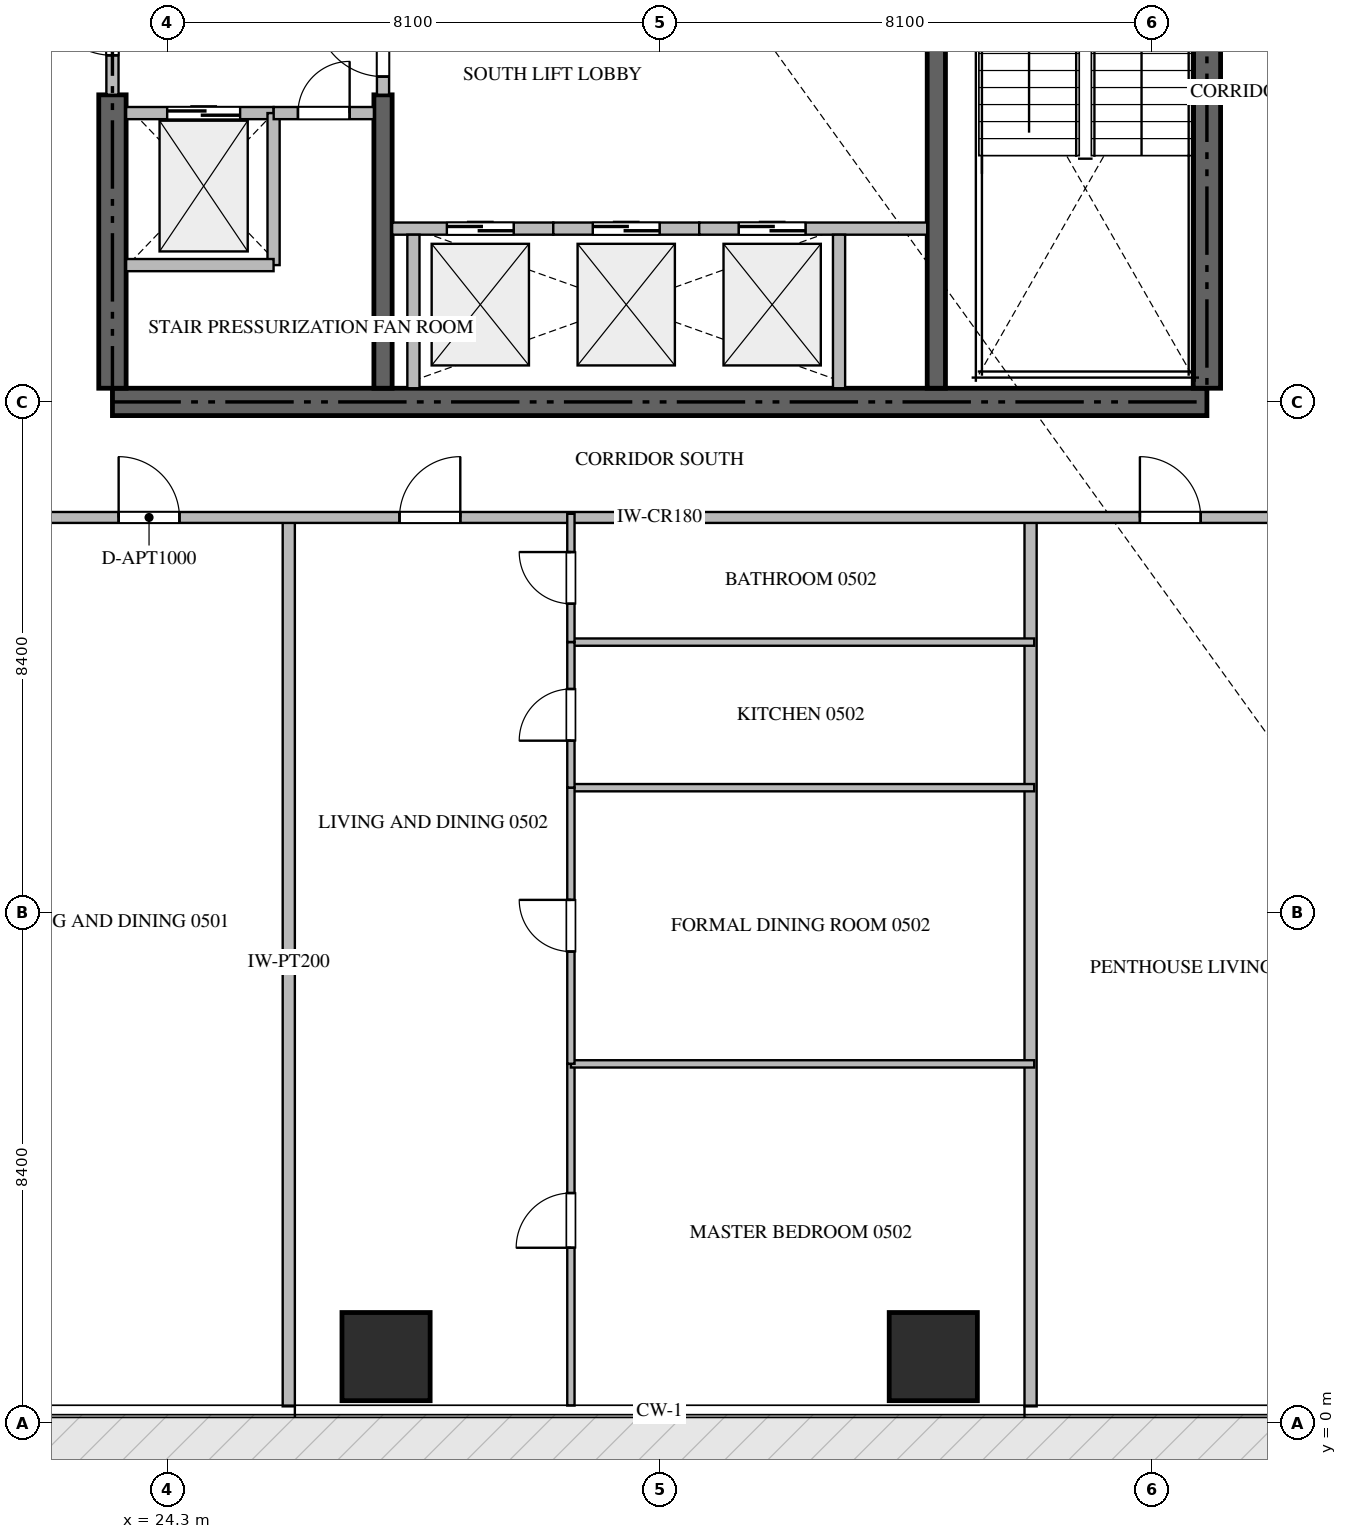
"""IFC4 building model, lengths in metres.
Left out: names, types, materials, properties, quantities, classifications, styles, units other than length and angle.
Written with IfcOpenShell. Run it as: python <this file> out.ifc"""

import sys

from ifc_helpers import new_model, si_unit, direction, frame, frame_2d, origin, origin_2d, place, context, subcontext, project, spatial, rectangle, extrude, source, transform, mapped, element, fill, save


model = new_model("IFC4")
c1 = context("Model", 3, precision=1e-05, world=origin(), true_north=direction((0.0, 1.0)))
c2 = subcontext(c1, "Body", "Model", "MODEL_VIEW")
j1 = project(units=[si_unit("LENGTHUNIT", "METRE"), si_unit("PLANEANGLEUNIT", "RADIAN")], contexts=[c1])
p1 = place(None, origin())
s1 = spatial("IfcSite", under=j1, at=p1, CompositionType="ELEMENT")
p2 = place(p1, origin())
s2 = spatial("IfcBuilding", under=s1, at=p2, CompositionType="ELEMENT")
p3 = place(p2, frame((0.0, 0.0, 26.7)))
s3 = spatial("IfcBuildingStorey", under=s2, at=p3, CompositionType="ELEMENT", Elevation=26.7)
p4 = place(p3, frame((23.4, 16.8, -0.44), z_axis=(0.0, 0.0, 1.0), x_axis=(1.0, 0.0, 0.0)))
e1 = element("IfcWall", 1, at=p4, inside=s3, PredefinedType="SHEAR", context=c2, shape_type="SweptSolid", body=[
    extrude(rectangle(XDim=18.0, YDim=0.45, at=frame_2d((9.0, 0.0))), origin(), (0.0, 0.0, 1.0), 3.928),
])
p5 = place(p3, frame((23.4, 17.025, -0.44), z_axis=(0.0, 0.0, 1.0), x_axis=(0.0, 1.0, 0.0)))
e2 = element("IfcWall", 2, at=p5, inside=s3, PredefinedType="SHEAR", context=c2, shape_type="SweptSolid", body=[
    extrude(rectangle(XDim=4.825, YDim=0.45, at=frame_2d((2.413, 0.0))), origin(), (0.0, 0.0, 1.0), 3.928),
])
p6 = place(p3, frame((41.4, 17.025, -0.44), z_axis=(0.0, 0.0, 1.0), x_axis=(0.0, 1.0, 0.0)))
e3 = element("IfcWall", 3, at=p6, inside=s3, PredefinedType="SHEAR", context=c2, shape_type="SweptSolid", body=[
    extrude(rectangle(XDim=8.325, YDim=0.45, at=frame_2d((4.163, 0.0))), origin(), (0.0, 0.0, 1.0), 3.928),
])
p7 = place(p3, frame((27.85, 17.025, -0.44), z_axis=(0.0, 0.0, 1.0), x_axis=(0.0, 1.0, 0.0)))
e4 = element("IfcWall", 4, at=p7, inside=s3, PredefinedType="SHEAR", context=c2, shape_type="SweptSolid", body=[
    extrude(rectangle(XDim=4.825, YDim=0.3, at=frame_2d((2.413, 0.0))), origin(), (0.0, 0.0, 1.0), 3.928),
])
p8 = place(p3, frame((36.95, 17.025, -0.44), z_axis=(0.0, 0.0, 1.0), x_axis=(0.0, 1.0, 0.0)))
e5 = element("IfcWall", 5, at=p8, inside=s3, PredefinedType="SHEAR", context=c2, shape_type="SweptSolid", body=[
    extrude(rectangle(XDim=8.325, YDim=0.3, at=frame_2d((4.163, 0.0))), origin(), (0.0, 0.0, 1.0), 3.928),
])
m1 = source(origin(), c2, "Body", "SweptSolid", [
    extrude(rectangle(XDim=1.45, YDim=1.45, at=origin_2d()), origin(), (0.0, 0.0, 1.0), 3.93),
])
for number, where, z_axis, x_axis in (
    (6, (27.9, 1.1, -0.44), (0.0, 0.0, 1.0), (1.0, 0.0, 0.0)),
    (7, (36.9, 1.1, -0.44), (0.0, 0.0, 1.0), (1.0, 0.0, 0.0)),
):
    element("IfcColumn", number, at=place(p3, frame(where, z_axis=z_axis, x_axis=x_axis)), inside=s3, PredefinedType="COLUMN", context=c2, shape_type="MappedRepresentation", body=[
        mapped(m1, transform((0.0, 0.0, 0.0), scale=1.0)),
    ])
p9 = place(p3, frame((23.625, 21.55, 0.0), z_axis=(0.0, 0.0, 1.0), x_axis=(1.0, 0.0, 0.0)))
e8 = element("IfcWall", 8, at=p9, inside=s3, PredefinedType="STANDARD", context=c2, shape_type="SweptSolid", body=[
    extrude(rectangle(XDim=2.425, YDim=0.2, at=frame_2d((1.212, 0.0))), origin(), (0.0, 0.0, 1.0), 3.49),
])
p10 = place(p9, frame((0.675, 0.0, 0.0)))
e9 = element("IfcOpeningElement", 9, at=p10, cuts=e8, PredefinedType="OPENING", context=c2, shape_type="SweptSolid", body=[
    extrude(rectangle(XDim=1.2, YDim=2.2, at=frame_2d((0.6, 1.1))), frame((0.0, 0.11, 0.0), z_axis=(0.0, -1.0, 0.0), x_axis=(1.0, 0.0, 0.0)), (0.0, 0.0, 1.0), 0.22),
])
p11 = place(p3, frame((28.0, 19.65, 0.0), z_axis=(0.0, 0.0, 1.0), x_axis=(1.0, 0.0, 0.0)))
e10 = element("IfcWall", 10, at=p11, inside=s3, PredefinedType="STANDARD", context=c2, shape_type="SweptSolid", body=[
    extrude(rectangle(XDim=2.65, YDim=0.2, at=frame_2d((1.325, 0.0))), origin(), (0.0, 0.0, 1.0), 3.49),
])
p12 = place(p11, frame((0.9, 0.0, 0.0)))
e11 = element("IfcOpeningElement", 11, at=p12, cuts=e10, PredefinedType="OPENING", context=c2, shape_type="SweptSolid", body=[
    extrude(rectangle(XDim=1.1, YDim=2.2, at=frame_2d((0.55, 1.1))), frame((0.0, 0.11, 0.0), z_axis=(0.0, -1.0, 0.0), x_axis=(1.0, 0.0, 0.0)), (0.0, 0.0, 1.0), 0.22),
])
p13 = place(p3, frame((28.35, 17.025, 0.0), z_axis=(0.0, 0.0, 1.0), x_axis=(0.0, 1.0, 0.0)))
e12 = element("IfcWall", 12, at=p13, inside=s3, PredefinedType="STANDARD", context=c2, shape_type="SweptSolid", body=[
    extrude(rectangle(XDim=2.525, YDim=0.2, at=frame_2d((1.263, 0.0))), origin(), (0.0, 0.0, 1.0), 3.49),
])
p14 = place(p3, frame((30.65, 19.65, 0.0), z_axis=(0.0, 0.0, 1.0), x_axis=(1.0, 0.0, 0.0)))
e13 = element("IfcWall", 13, at=p14, inside=s3, PredefinedType="STANDARD", context=c2, shape_type="SweptSolid", body=[
    extrude(rectangle(XDim=2.4, YDim=0.2, at=frame_2d((1.2, 0.0))), origin(), (0.0, 0.0, 1.0), 3.49),
])
p15 = place(p14, frame((0.65, 0.0, 0.0)))
e14 = element("IfcOpeningElement", 14, at=p15, cuts=e13, PredefinedType="OPENING", context=c2, shape_type="SweptSolid", body=[
    extrude(rectangle(XDim=1.1, YDim=2.2, at=frame_2d((0.55, 1.1))), frame((0.0, 0.11, 0.0), z_axis=(0.0, -1.0, 0.0), x_axis=(1.0, 0.0, 0.0)), (0.0, 0.0, 1.0), 0.22),
])
p16 = place(p3, frame((33.05, 19.65, 0.0), z_axis=(0.0, 0.0, 1.0), x_axis=(1.0, 0.0, 0.0)))
e15 = element("IfcWall", 15, at=p16, inside=s3, PredefinedType="STANDARD", context=c2, shape_type="SweptSolid", body=[
    extrude(rectangle(XDim=3.75, YDim=0.2, at=frame_2d((1.875, 0.0))), origin(), (0.0, 0.0, 1.0), 3.49),
])
p17 = place(p16, frame((0.65, 0.0, 0.0)))
e16 = element("IfcOpeningElement", 16, at=p17, cuts=e15, PredefinedType="OPENING", context=c2, shape_type="SweptSolid", body=[
    extrude(rectangle(XDim=1.1, YDim=2.2, at=frame_2d((0.55, 1.1))), frame((0.0, 0.11, 0.0), z_axis=(0.0, -1.0, 0.0), x_axis=(1.0, 0.0, 0.0)), (0.0, 0.0, 1.0), 0.22),
])
p18 = place(p3, frame((35.35, 17.025, 0.0), z_axis=(0.0, 0.0, 1.0), x_axis=(0.0, 1.0, 0.0)))
e17 = element("IfcWall", 17, at=p18, inside=s3, PredefinedType="STANDARD", context=c2, shape_type="SweptSolid", body=[
    extrude(rectangle(XDim=2.525, YDim=0.2, at=frame_2d((1.263, 0.0))), origin(), (0.0, 0.0, 1.0), 3.49),
])
p19 = place(p3, frame((26.05, 19.05, 0.0), z_axis=(0.0, 0.0, 1.0), x_axis=(0.0, 1.0, 0.0)))
e18 = element("IfcWall", 18, at=p19, inside=s3, PredefinedType="STANDARD", context=c2, shape_type="SweptSolid", body=[
    extrude(rectangle(XDim=2.5, YDim=0.2, at=frame_2d((1.25, 0.0))), origin(), (0.0, 0.0, 1.0), 3.49),
])
p20 = place(p3, frame((23.625, 19.05, 0.0), z_axis=(0.0, 0.0, 1.0), x_axis=(1.0, 0.0, 0.0)))
e19 = element("IfcWall", 19, at=p20, inside=s3, PredefinedType="STANDARD", context=c2, shape_type="SweptSolid", body=[
    extrude(rectangle(XDim=2.425, YDim=0.2, at=frame_2d((1.212, 0.0))), origin(), (0.0, 0.0, 1.0), 3.49),
])
p21 = place(p3, frame((26.052, 21.55, 0.0), z_axis=(0.0, 0.0, 1.0), x_axis=(1.0, 0.0, 0.0)))
e20 = element("IfcWall", 20, at=p21, inside=s3, PredefinedType="STANDARD", context=c2, shape_type="SweptSolid", body=[
    extrude(rectangle(XDim=1.648, YDim=0.2, at=frame_2d((0.824, 0.0))), origin(), (0.0, 0.0, 1.0), 3.49),
])
p22 = place(p21, frame((0.399, 0.0, 0.0)))
e21 = element("IfcOpeningElement", 21, at=p22, cuts=e20, PredefinedType="OPENING", context=c2, shape_type="SweptSolid", body=[
    extrude(rectangle(XDim=0.85, YDim=2.1, at=frame_2d((0.425, 1.05))), frame((0.0, 0.11, 0.0), z_axis=(0.0, -1.0, 0.0), x_axis=(1.0, 0.0, 0.0)), (0.0, 0.0, 1.0), 0.22),
])
p23 = place(p3, frame((23.4, 21.852, 0.0), z_axis=(0.0, 0.0, 1.0), x_axis=(0.0, 1.0, 0.0)))
e22 = element("IfcWall", 22, at=p23, inside=s3, PredefinedType="STANDARD", context=c2, shape_type="SweptSolid", body=[
    extrude(rectangle(XDim=2.396, YDim=0.2, at=frame_2d((1.198, 0.0))), origin(), (0.0, 0.0, 1.0), 3.49),
])
p24 = place(p23, frame((0.648, 0.0, 0.0)))
e23 = element("IfcOpeningElement", 23, at=p24, cuts=e22, PredefinedType="OPENING", context=c2, shape_type="SweptSolid", body=[
    extrude(rectangle(XDim=1.1, YDim=2.15, at=frame_2d((0.55, 1.075))), frame((0.0, 0.11, 0.0), z_axis=(0.0, -1.0, 0.0), x_axis=(1.0, 0.0, 0.0)), (0.0, 0.0, 1.0), 0.22),
])
p25 = place(p3, frame((27.85, 21.852, 0.0), z_axis=(0.0, 0.0, 1.0), x_axis=(0.0, 1.0, 0.0)))
e24 = element("IfcWall", 24, at=p25, inside=s3, PredefinedType="STANDARD", context=c2, shape_type="SweptSolid", body=[
    extrude(rectangle(XDim=1.696, YDim=0.2, at=frame_2d((0.848, 0.0))), origin(), (0.0, 0.0, 1.0), 3.49),
])
p26 = place(p25, frame((0.298, 0.0, 0.0)))
e25 = element("IfcOpeningElement", 25, at=p26, cuts=e24, PredefinedType="OPENING", context=c2, shape_type="SweptSolid", body=[
    extrude(rectangle(XDim=1.1, YDim=2.15, at=frame_2d((0.55, 1.075))), frame((0.0, 0.11, 0.0), z_axis=(0.0, -1.0, 0.0), x_axis=(1.0, 0.0, 0.0)), (0.0, 0.0, 1.0), 0.22),
])
for number, where, z_axis, x_axis in (
    (26, (26.3, 0.282, 0.0), (0.0, 0.0, 1.0), (0.0, 1.0, 0.0)),
    (27, (38.5, 0.282, 0.0), (0.0, 0.0, 1.0), (0.0, 1.0, 0.0)),
):
    element("IfcWall", number, at=place(p3, frame(where, z_axis=z_axis, x_axis=x_axis)), inside=s3, PredefinedType="PARTITIONING", context=c2, shape_type="SweptSolid", body=[
        extrude(rectangle(XDim=14.618, YDim=0.2, at=frame_2d((7.309, 0.0))), origin(), (0.0, 0.0, 1.0), 3.49),
    ])
p27 = place(p3, frame((21.402, 14.9, 0.0), z_axis=(0.0, 0.0, 1.0), x_axis=(1.0, 0.0, 0.0)))
e28 = element("IfcWall", 28, at=p27, inside=s3, PredefinedType="PARTITIONING", context=c2, shape_type="SweptSolid", body=[
    extrude(rectangle(XDim=21.996, YDim=0.18, at=frame_2d((10.998, 0.0))), origin(), (0.0, 0.0, 1.0), 3.49),
])
p28 = place(p27, frame((2.1, 0.0, 0.0)))
e29 = element("IfcOpeningElement", 29, at=p28, cuts=e28, PredefinedType="OPENING", context=c2, shape_type="SweptSolid", body=[
    extrude(rectangle(XDim=1.0, YDim=2.15, at=frame_2d((0.5, 1.075))), frame((0.0, 0.1, 0.0), z_axis=(0.0, -1.0, 0.0), x_axis=(1.0, 0.0, 0.0)), (0.0, 0.0, 1.0), 0.2),
])
p29 = place(p27, frame((6.719, 0.0, 0.0)))
e30 = element("IfcOpeningElement", 30, at=p29, cuts=e28, PredefinedType="OPENING", context=c2, shape_type="SweptSolid", body=[
    extrude(rectangle(XDim=1.0, YDim=2.15, at=frame_2d((0.5, 1.075))), frame((0.0, 0.1, 0.0), z_axis=(0.0, -1.0, 0.0), x_axis=(1.0, 0.0, 0.0)), (0.0, 0.0, 1.0), 0.2),
])
p30 = place(p27, frame((18.896, 0.0, 0.0)))
e31 = element("IfcOpeningElement", 31, at=p30, cuts=e28, PredefinedType="OPENING", context=c2, shape_type="SweptSolid", body=[
    extrude(rectangle(XDim=1.0, YDim=2.15, at=frame_2d((0.5, 1.075))), frame((0.0, 0.1, 0.0), z_axis=(0.0, -1.0, 0.0), x_axis=(1.0, 0.0, 0.0)), (0.0, 0.0, 1.0), 0.2),
])
p31 = place(p3, frame((30.94, 0.295, 0.0), z_axis=(0.0, 0.0, 1.0), x_axis=(0.0, 1.0, 0.0)))
e32 = element("IfcWall", 32, at=p31, inside=s3, PredefinedType="PARTITIONING", context=c2, shape_type="SweptSolid", body=[
    extrude(rectangle(XDim=5.619, YDim=0.12, at=frame_2d((2.81, 0.0))), origin(), (0.0, 0.0, 1.0), 3.49),
])
p32 = place(p31, frame((2.595, 0.0, 0.0)))
e33 = element("IfcOpeningElement", 33, at=p32, cuts=e32, PredefinedType="OPENING", context=c2, shape_type="SweptSolid", body=[
    extrude(rectangle(XDim=0.9, YDim=2.1, at=frame_2d((0.45, 1.05))), frame((0.0, 0.07, 0.0), z_axis=(0.0, -1.0, 0.0), x_axis=(1.0, 0.0, 0.0)), (0.0, 0.0, 1.0), 0.14),
])
for number, where, z_axis, x_axis in (
    (34, (30.94, 5.914, 0.0), (0.0, 0.0, 1.0), (1.0, 0.0, 0.0)),
    (35, (30.94, 10.456, 0.0), (0.0, 0.0, 1.0), (1.0, 0.0, 0.0)),
    (36, (30.94, 12.85, 0.0), (0.0, 0.0, 1.0), (1.0, 0.0, 0.0)),
):
    element("IfcWall", number, at=place(p3, frame(where, z_axis=z_axis, x_axis=x_axis)), inside=s3, PredefinedType="PARTITIONING", context=c2, shape_type="SweptSolid", body=[
        extrude(rectangle(XDim=7.62, YDim=0.12, at=frame_2d((3.81, 0.0))), origin(), (0.0, 0.0, 1.0), 3.49),
    ])
p33 = place(p3, frame((30.94, 5.916, 0.0), z_axis=(0.0, 0.0, 1.0), x_axis=(0.0, 1.0, 0.0)))
e37 = element("IfcWall", 37, at=p33, inside=s3, PredefinedType="PARTITIONING", context=c2, shape_type="SweptSolid", body=[
    extrude(rectangle(XDim=4.54, YDim=0.12, at=frame_2d((2.27, 0.0))), origin(), (0.0, 0.0, 1.0), 3.49),
])
p34 = place(p33, frame((1.845, 0.0, 0.0)))
e38 = element("IfcOpeningElement", 38, at=p34, cuts=e37, PredefinedType="OPENING", context=c2, shape_type="SweptSolid", body=[
    extrude(rectangle(XDim=0.85, YDim=2.1, at=frame_2d((0.425, 1.05))), frame((0.0, 0.07, 0.0), z_axis=(0.0, -1.0, 0.0), x_axis=(1.0, 0.0, 0.0)), (0.0, 0.0, 1.0), 0.14),
])
p35 = place(p3, frame((30.94, 10.458, 0.0), z_axis=(0.0, 0.0, 1.0), x_axis=(0.0, 1.0, 0.0)))
e39 = element("IfcWall", 39, at=p35, inside=s3, PredefinedType="PARTITIONING", context=c2, shape_type="SweptSolid", body=[
    extrude(rectangle(XDim=2.392, YDim=0.12, at=frame_2d((1.196, 0.0))), origin(), (0.0, 0.0, 1.0), 3.49),
])
p36 = place(p35, frame((0.771, 0.0, 0.0)))
e40 = element("IfcOpeningElement", 40, at=p36, cuts=e39, PredefinedType="OPENING", context=c2, shape_type="SweptSolid", body=[
    extrude(rectangle(XDim=0.85, YDim=2.1, at=frame_2d((0.425, 1.05))), frame((0.0, 0.07, 0.0), z_axis=(0.0, -1.0, 0.0), x_axis=(1.0, 0.0, 0.0)), (0.0, 0.0, 1.0), 0.14),
])
p37 = place(p3, frame((30.94, 12.852, 0.0), z_axis=(0.0, 0.0, 1.0), x_axis=(0.0, 1.0, 0.0)))
e41 = element("IfcWall", 41, at=p37, inside=s3, PredefinedType="PARTITIONING", context=c2, shape_type="SweptSolid", body=[
    extrude(rectangle(XDim=2.108, YDim=0.12, at=frame_2d((1.054, 0.0))), origin(), (0.0, 0.0, 1.0), 3.49),
])
p38 = place(p37, frame((0.629, 0.0, 0.0)))
e42 = element("IfcOpeningElement", 42, at=p38, cuts=e41, PredefinedType="OPENING", context=c2, shape_type="SweptSolid", body=[
    extrude(rectangle(XDim=0.85, YDim=2.1, at=frame_2d((0.425, 1.05))), frame((0.0, 0.07, 0.0), z_axis=(0.0, -1.0, 0.0), x_axis=(1.0, 0.0, 0.0)), (0.0, 0.0, 1.0), 0.14),
])
m2 = source(origin(), c2, "Body", "SweptSolid", [
    extrude(rectangle(XDim=1.2, YDim=2.2, at=frame_2d((0.6, 1.1))), frame((0.0, 0.025, 0.0), z_axis=(0.0, -1.0, 0.0), x_axis=(1.0, 0.0, 0.0)), (0.0, 0.0, 1.0), 0.05),
])
p39 = place(p10, origin())
e43 = element("IfcDoor", 43, at=p39, inside=s3, OperationType="DOUBLE_DOOR_SLIDING", PredefinedType="DOOR", context=c2, shape_type="MappedRepresentation", body=[
    mapped(m2, transform((0.0, 0.0, 0.0), scale=1.0)),
])
fill(e9, e43)
m3 = source(origin(), c2, "Body", "SweptSolid", [
    extrude(rectangle(XDim=1.1, YDim=2.2, at=frame_2d((0.55, 1.1))), frame((0.0, 0.025, 0.0), z_axis=(0.0, -1.0, 0.0), x_axis=(1.0, 0.0, 0.0)), (0.0, 0.0, 1.0), 0.05),
])
p40 = place(p12, origin())
e44 = element("IfcDoor", 44, at=p40, inside=s3, OperationType="DOUBLE_DOOR_SLIDING", PredefinedType="DOOR", context=c2, shape_type="MappedRepresentation", body=[
    mapped(m3, transform((0.0, 0.0, 0.0), scale=1.0)),
])
fill(e11, e44)
p41 = place(p15, origin())
e45 = element("IfcDoor", 45, at=p41, inside=s3, OperationType="DOUBLE_DOOR_SLIDING", PredefinedType="DOOR", context=c2, shape_type="MappedRepresentation", body=[
    mapped(m3, transform((0.0, 0.0, 0.0), scale=1.0)),
])
fill(e14, e45)
p42 = place(p17, origin())
e46 = element("IfcDoor", 46, at=p42, inside=s3, OperationType="DOUBLE_DOOR_SLIDING", PredefinedType="DOOR", context=c2, shape_type="MappedRepresentation", body=[
    mapped(m3, transform((0.0, 0.0, 0.0), scale=1.0)),
])
fill(e16, e46)
m4 = source(origin(), c2, "Body", "SweptSolid", [
    extrude(rectangle(XDim=0.85, YDim=2.1, at=frame_2d((0.425, 1.05))), frame((0.0, 0.025, 0.0), z_axis=(0.0, -1.0, 0.0), x_axis=(1.0, 0.0, 0.0)), (0.0, 0.0, 1.0), 0.05),
])
p43 = place(p22, origin())
e47 = element("IfcDoor", 47, at=p43, inside=s3, OperationType="SINGLE_SWING_RIGHT", PredefinedType="DOOR", context=c2, shape_type="MappedRepresentation", body=[
    mapped(m4, transform((0.0, 0.0, 0.0), scale=1.0)),
])
fill(e21, e47)
m5 = source(origin(), c2, "Body", "SweptSolid", [
    extrude(rectangle(XDim=1.1, YDim=2.15, at=frame_2d((0.55, 1.075))), frame((0.0, 0.025, 0.0), z_axis=(0.0, -1.0, 0.0), x_axis=(1.0, 0.0, 0.0)), (0.0, 0.0, 1.0), 0.05),
])
p44 = place(p24, origin())
e48 = element("IfcDoor", 48, at=p44, inside=s3, OperationType="SINGLE_SWING_RIGHT", PredefinedType="DOOR", context=c2, shape_type="MappedRepresentation", body=[
    mapped(m5, transform((0.0, 0.0, 0.0), scale=1.0)),
])
fill(e23, e48)
p45 = place(p26, origin())
e49 = element("IfcDoor", 49, at=p45, inside=s3, OperationType="SINGLE_SWING_RIGHT", PredefinedType="DOOR", context=c2, shape_type="MappedRepresentation", body=[
    mapped(m5, transform((0.0, 0.0, 0.0), scale=1.0)),
])
fill(e25, e49)
m6 = source(origin(), c2, "Body", "SweptSolid", [
    extrude(rectangle(XDim=1.0, YDim=2.15, at=frame_2d((0.5, 1.075))), frame((0.0, 0.025, 0.0), z_axis=(0.0, -1.0, 0.0), x_axis=(1.0, 0.0, 0.0)), (0.0, 0.0, 1.0), 0.05),
])
p46 = place(p28, origin())
e50 = element("IfcDoor", 50, at=p46, inside=s3, OperationType="SINGLE_SWING_LEFT", PredefinedType="DOOR", context=c2, shape_type="MappedRepresentation", body=[
    mapped(m6, transform((0.0, 0.0, 0.0), scale=1.0)),
])
fill(e29, e50)
p47 = place(p29, origin())
e51 = element("IfcDoor", 51, at=p47, inside=s3, OperationType="SINGLE_SWING_RIGHT", PredefinedType="DOOR", context=c2, shape_type="MappedRepresentation", body=[
    mapped(m6, transform((0.0, 0.0, 0.0), scale=1.0)),
])
fill(e30, e51)
p48 = place(p30, origin())
e52 = element("IfcDoor", 52, at=p48, inside=s3, OperationType="SINGLE_SWING_LEFT", PredefinedType="DOOR", context=c2, shape_type="MappedRepresentation", body=[
    mapped(m6, transform((0.0, 0.0, 0.0), scale=1.0)),
])
fill(e31, e52)
m7 = source(origin(), c2, "Body", "SweptSolid", [
    extrude(rectangle(XDim=0.9, YDim=2.1, at=frame_2d((0.45, 1.05))), frame((0.0, 0.025, 0.0), z_axis=(0.0, -1.0, 0.0), x_axis=(1.0, 0.0, 0.0)), (0.0, 0.0, 1.0), 0.05),
])
p49 = place(p32, origin())
e53 = element("IfcDoor", 53, at=p49, inside=s3, OperationType="SINGLE_SWING_LEFT", PredefinedType="DOOR", context=c2, shape_type="MappedRepresentation", body=[
    mapped(m7, transform((0.0, 0.0, 0.0), scale=1.0)),
])
fill(e33, e53)
p50 = place(p34, origin())
e54 = element("IfcDoor", 54, at=p50, inside=s3, OperationType="SINGLE_SWING_RIGHT", PredefinedType="DOOR", context=c2, shape_type="MappedRepresentation", body=[
    mapped(m4, transform((0.0, 0.0, 0.0), scale=1.0)),
])
fill(e38, e54)
p51 = place(p36, origin())
e55 = element("IfcDoor", 55, at=p51, inside=s3, OperationType="SINGLE_SWING_LEFT", PredefinedType="DOOR", context=c2, shape_type="MappedRepresentation", body=[
    mapped(m4, transform((0.0, 0.0, 0.0), scale=1.0)),
])
fill(e40, e55)
p52 = place(p38, origin())
e56 = element("IfcDoor", 56, at=p52, inside=s3, OperationType="SINGLE_SWING_RIGHT", PredefinedType="DOOR", context=c2, shape_type="MappedRepresentation", body=[
    mapped(m4, transform((0.0, 0.0, 0.0), scale=1.0)),
])
fill(e42, e56)
save(model, sys.argv[1])
